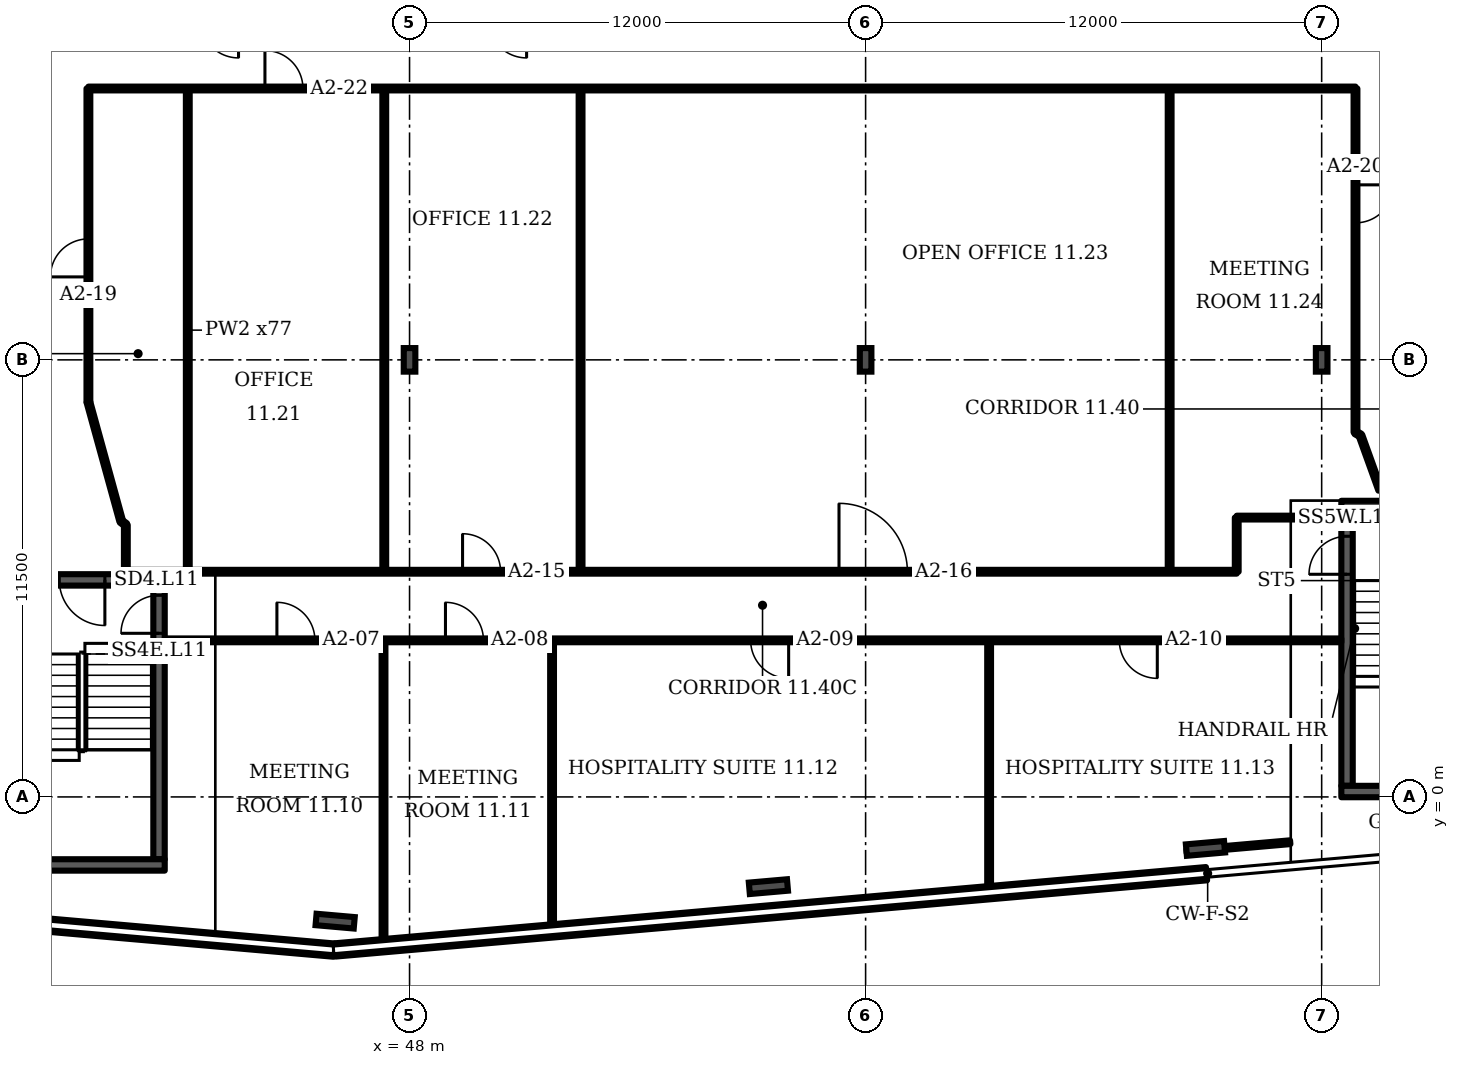
"""IFC4 building model, lengths in metres.
Left out: names, types, materials, properties, quantities, classifications, styles, units other than length and angle.
Written with IfcOpenShell. Run it as: python <this file> out.ifc"""

import sys

from ifc_helpers import new_model, si_unit, direction, frame, frame_2d, origin, origin_2d, place, context, subcontext, project, spatial, rectangle, i_section, extrude, element, fill, save


model = new_model("IFC4")
c1 = context("Model", 3, precision=1e-05, world=origin(), true_north=direction((0.0, 1.0)))
c2 = subcontext(c1, "Body", "Model", "MODEL_VIEW")
j1 = project(units=[si_unit("LENGTHUNIT", "METRE"), si_unit("PLANEANGLEUNIT", "RADIAN")], contexts=[c1])
p1 = place(None, origin())
s1 = spatial("IfcSite", under=j1, at=p1, CompositionType="ELEMENT")
p2 = place(p1, origin())
s2 = spatial("IfcBuilding", under=s1, at=p2, CompositionType="ELEMENT")
p3 = place(p2, frame((0.0, 0.0, 59.5)))
s3 = spatial("IfcBuildingStorey", under=s2, at=p3, CompositionType="ELEMENT", Elevation=59.5)
for number, where, z_axis, x_axis in (
    (1, (46.042, -3.268, 0.0), (0.0, 0.0, 1.0), (-0.087, -0.996, 0.0)),
    (2, (57.442, -2.361, 0.0), (0.0, 0.0, 1.0), (0.087, -0.996, 0.0)),
    (3, (68.942, -1.355, 0.0), (0.0, 0.0, 1.0), (0.087, -0.996, 0.0)),
):
    element("IfcColumn", number, at=place(p3, frame(where, z_axis=z_axis, x_axis=x_axis)), inside=s3, PredefinedType="COLUMN", context=c2, shape_type="SweptSolid", body=[
        extrude(i_section(OverallWidth=0.302, OverallDepth=1.008, WebThickness=0.021, FlangeThickness=0.04, FilletRadius=0.03, at=origin_2d()), origin(), (0.0, 0.0, 1.0), 3.6),
    ])
for number, where, z_axis, x_axis in (
    (4, (48.0, 11.5, 0.0), (0.0, 0.0, 1.0), (1.0, 0.0, 0.0)),
    (5, (60.0, 11.5, 0.0), (0.0, 0.0, 1.0), (1.0, 0.0, 0.0)),
    (6, (72.0, 11.5, 0.0), (0.0, 0.0, 1.0), (1.0, 0.0, 0.0)),
):
    element("IfcColumn", number, at=place(p3, frame(where, z_axis=z_axis, x_axis=x_axis)), inside=s3, PredefinedType="COLUMN", context=c2, shape_type="SweptSolid", body=[
        extrude(i_section(OverallWidth=0.305, OverallDepth=0.62, WebThickness=0.021, FlangeThickness=0.04, FilletRadius=0.027, at=origin_2d()), origin(), (0.0, 0.0, 1.0), 3.6),
    ])
p4 = place(p3, frame((34.601, -3.032, 0.0), z_axis=(0.0, 0.0, 1.0), x_axis=(0.996193, -0.087148, 0.0)))
e7 = element("IfcWall", 7, at=p4, inside=s3, PredefinedType="SOLIDWALL", context=c2, shape_type="SweptSolid", body=[
    extrude(rectangle(XDim=11.458, YDim=0.35, at=frame_2d((5.729, 0.0))), origin(), (0.0, 0.0, 1.0), 1.0),
])
p5 = place(p3, frame((46.045, -4.026, 0.0), z_axis=(0.0, 0.0, 1.0), x_axis=(0.99619, 0.087163, 0.0)))
e8 = element("IfcWall", 8, at=p5, inside=s3, PredefinedType="SOLIDWALL", context=c2, shape_type="SweptSolid", body=[
    extrude(rectangle(XDim=23.013, YDim=0.35, at=frame_2d((11.506, 0.0))), origin(), (0.0, 0.0, 1.0), 1.0),
])
p6 = place(p3, frame((37.208, 5.711, 0.0), z_axis=(0.0, 0.0, 1.0), x_axis=(1.0, 0.0, 0.0)))
e9 = element("IfcWall", 9, at=p6, inside=s3, PredefinedType="SHEAR", context=c2, shape_type="SweptSolid", body=[
    extrude(rectangle(XDim=4.35, YDim=0.3, at=frame_2d((2.175, 0.0))), origin(), (0.0, 0.0, 1.0), 3.2),
])
p7 = place(p6, frame((1.575, 0.0, 0.0)))
e10 = element("IfcOpeningElement", 10, at=p7, cuts=e9, PredefinedType="OPENING", context=c2, shape_type="SweptSolid", body=[
    extrude(rectangle(XDim=1.2, YDim=2.1, at=frame_2d((0.6, 1.05))), frame((0.0, 0.16, 0.0), z_axis=(0.0, -1.0, 0.0), x_axis=(1.0, 0.0, 0.0)), (0.0, 0.0, 1.0), 0.32),
])
p8 = place(p3, frame((41.408, -1.639, 0.0), z_axis=(0.0, 0.0, 1.0), x_axis=(0.0, 1.0, 0.0)))
e11 = element("IfcWall", 11, at=p8, inside=s3, PredefinedType="SHEAR", context=c2, shape_type="SweptSolid", body=[
    extrude(rectangle(XDim=7.2, YDim=0.3, at=frame_2d((3.6, 0.0))), origin(), (0.0, 0.0, 1.0), 3.2),
])
p9 = place(p8, frame((5.945, 0.0, 0.0)))
e12 = element("IfcOpeningElement", 12, at=p9, cuts=e11, PredefinedType="OPENING", context=c2, shape_type="SweptSolid", body=[
    extrude(rectangle(XDim=1.0, YDim=2.1, at=frame_2d((0.5, 1.05))), frame((0.0, 0.16, 0.0), z_axis=(0.0, -1.0, 0.0), x_axis=(1.0, 0.0, 0.0)), (0.0, 0.0, 1.0), 0.32),
])
p10 = place(p3, frame((72.518, 7.642, 0.0), z_axis=(0.0, 0.0, 1.0), x_axis=(1.0, 0.0, 0.0)))
e13 = element("IfcWall", 13, at=p10, inside=s3, PredefinedType="SHEAR", context=c2, shape_type="SweptSolid", body=[
    extrude(rectangle(XDim=4.35, YDim=0.3, at=frame_2d((2.175, 0.0))), origin(), (0.0, 0.0, 1.0), 3.2),
])
p11 = place(p10, frame((1.575, 0.0, 0.0)))
e14 = element("IfcOpeningElement", 14, at=p11, cuts=e13, PredefinedType="OPENING", context=c2, shape_type="SweptSolid", body=[
    extrude(rectangle(XDim=1.2, YDim=2.1, at=frame_2d((0.6, 1.05))), frame((0.0, 0.16, 0.0), z_axis=(0.0, -1.0, 0.0), x_axis=(1.0, 0.0, 0.0)), (0.0, 0.0, 1.0), 0.32),
])
p12 = place(p3, frame((72.667, 0.292, 0.0), z_axis=(0.0, 0.0, 1.0), x_axis=(0.0, 1.0, 0.0)))
e15 = element("IfcWall", 15, at=p12, inside=s3, PredefinedType="SHEAR", context=c2, shape_type="SweptSolid", body=[
    extrude(rectangle(XDim=7.2, YDim=0.3, at=frame_2d((3.6, 0.0))), origin(), (0.0, 0.0, 1.0), 3.2),
])
p13 = place(p12, frame((5.566, 0.0, 0.0)))
e16 = element("IfcOpeningElement", 16, at=p13, cuts=e15, PredefinedType="OPENING", context=c2, shape_type="SweptSolid", body=[
    extrude(rectangle(XDim=1.0, YDim=2.1, at=frame_2d((0.5, 1.05))), frame((0.0, 0.16, 0.0), z_axis=(0.0, -1.0, 0.0), x_axis=(1.0, 0.0, 0.0)), (0.0, 0.0, 1.0), 0.32),
])
p14 = place(p3, frame((39.55, 10.39, 0.0), z_axis=(0.0, 0.0, 1.0), x_axis=(0.0, 1.0, 0.0)))
e17 = element("IfcWall", 17, at=p14, inside=s3, PredefinedType="PARTITIONING", context=c2, shape_type="SweptSolid", body=[
    extrude(rectangle(XDim=8.25, YDim=0.1, at=frame_2d((4.125, 0.0))), origin(), (0.0, 0.0, 1.0), 3.2),
])
p15 = place(p14, frame((3.293, 0.0, 0.0)))
e18 = element("IfcOpeningElement", 18, at=p15, cuts=e17, PredefinedType="OPENING", context=c2, shape_type="SweptSolid", body=[
    extrude(rectangle(XDim=1.0, YDim=2.1, at=frame_2d((0.5, 1.05))), frame((0.0, 0.06, 0.0), z_axis=(0.0, -1.0, 0.0), x_axis=(1.0, 0.0, 0.0)), (0.0, 0.0, 1.0), 0.12),
])
p16 = place(p3, frame((39.55, 18.64, 0.0), z_axis=(0.0, 0.0, 1.0), x_axis=(1.0, 0.0, 0.0)))
e19 = element("IfcWall", 19, at=p16, inside=s3, PredefinedType="PARTITIONING", context=c2, shape_type="SweptSolid", body=[
    extrude(rectangle(XDim=33.34, YDim=0.1, at=frame_2d((16.67, 0.0))), origin(), (0.0, 0.0, 1.0), 3.2),
])
p17 = place(p16, frame((4.645, 0.0, 0.0)))
e20 = element("IfcOpeningElement", 20, at=p17, cuts=e19, PredefinedType="OPENING", context=c2, shape_type="SweptSolid", body=[
    extrude(rectangle(XDim=1.0, YDim=2.1, at=frame_2d((0.5, 1.05))), frame((0.0, 0.06, 0.0), z_axis=(0.0, -1.0, 0.0), x_axis=(1.0, 0.0, 0.0)), (0.0, 0.0, 1.0), 0.12),
])
p18 = place(p3, frame((40.415, 7.25, 0.0), z_axis=(0.0, 0.0, 1.0), x_axis=(-0.26559, 0.964085, 0.0)))
e21 = element("IfcWall", 21, at=p18, inside=s3, PredefinedType="PARTITIONING", context=c2, shape_type="SweptSolid", body=[
    extrude(rectangle(XDim=3.257, YDim=0.1, at=frame_2d((1.628, 0.0))), origin(), (0.0, 0.0, 1.0), 3.2),
])
p19 = place(p3, frame((40.535, 5.925, 0.0), z_axis=(0.0, 0.0, 1.0), x_axis=(0.0, 1.0, 0.0)))
e22 = element("IfcWall", 22, at=p19, inside=s3, PredefinedType="PARTITIONING", context=c2, shape_type="SweptSolid", body=[
    extrude(rectangle(XDim=1.235, YDim=0.1, at=frame_2d((0.617, 0.0))), origin(), (0.0, 0.0, 1.0), 3.2),
])
p20 = place(p3, frame((40.535, 5.925, 0.0), z_axis=(0.0, 0.0, 1.0), x_axis=(1.0, 0.0, 0.0)))
e23 = element("IfcWall", 23, at=p20, inside=s3, PredefinedType="PARTITIONING", context=c2, shape_type="SweptSolid", body=[
    extrude(rectangle(XDim=29.23, YDim=0.1, at=frame_2d((14.615, 0.0))), origin(), (0.0, 0.0, 1.0), 3.2),
])
p21 = place(p20, frame((8.86, 0.0, 0.0)))
e24 = element("IfcOpeningElement", 24, at=p21, cuts=e23, PredefinedType="OPENING", context=c2, shape_type="SweptSolid", body=[
    extrude(rectangle(XDim=1.0, YDim=2.1, at=frame_2d((0.5, 1.05))), frame((0.0, 0.06, 0.0), z_axis=(0.0, -1.0, 0.0), x_axis=(1.0, 0.0, 0.0)), (0.0, 0.0, 1.0), 0.12),
])
p22 = place(p20, frame((18.765, 0.0, 0.0)))
e25 = element("IfcOpeningElement", 25, at=p22, cuts=e23, PredefinedType="OPENING", context=c2, shape_type="SweptSolid", body=[
    extrude(rectangle(XDim=1.8, YDim=2.1, at=frame_2d((0.9, 1.05))), frame((0.0, 0.06, 0.0), z_axis=(0.0, -1.0, 0.0), x_axis=(1.0, 0.0, 0.0)), (0.0, 0.0, 1.0), 0.12),
])
p23 = place(p3, frame((40.535, 7.16, 0.0), z_axis=(0.0, 0.0, 1.0), x_axis=(-0.799412, 0.60078, 0.0)))
e26 = element("IfcWall", 26, at=p23, inside=s3, PredefinedType="PARTITIONING", context=c2, shape_type="SweptSolid", body=[
    extrude(rectangle(XDim=0.15, YDim=0.1, at=frame_2d((0.075, 0.0))), origin(), (0.0, 0.0, 1.0), 3.2),
])
p24 = place(p3, frame((41.558, 4.12, 0.0), z_axis=(0.0, 0.0, 1.0), x_axis=(1.0, 0.0, 0.0)))
e27 = element("IfcWall", 27, at=p24, inside=s3, PredefinedType="PARTITIONING", context=c2, shape_type="SweptSolid", body=[
    extrude(rectangle(XDim=30.959, YDim=0.1, at=frame_2d((15.479, 0.0))), origin(), (0.0, 0.0, 1.0), 3.2),
])
p25 = place(p24, frame((2.952, 0.0, 0.0)))
e28 = element("IfcOpeningElement", 28, at=p25, cuts=e27, PredefinedType="OPENING", context=c2, shape_type="SweptSolid", body=[
    extrude(rectangle(XDim=1.0, YDim=2.1, at=frame_2d((0.5, 1.05))), frame((0.0, 0.06, 0.0), z_axis=(0.0, -1.0, 0.0), x_axis=(1.0, 0.0, 0.0)), (0.0, 0.0, 1.0), 0.12),
])
p26 = place(p24, frame((7.387, 0.0, 0.0)))
e29 = element("IfcOpeningElement", 29, at=p26, cuts=e27, PredefinedType="OPENING", context=c2, shape_type="SweptSolid", body=[
    extrude(rectangle(XDim=1.0, YDim=2.1, at=frame_2d((0.5, 1.05))), frame((0.0, 0.06, 0.0), z_axis=(0.0, -1.0, 0.0), x_axis=(1.0, 0.0, 0.0)), (0.0, 0.0, 1.0), 0.12),
])
p27 = place(p24, frame((15.417, 0.0, 0.0)))
e30 = element("IfcOpeningElement", 30, at=p27, cuts=e27, PredefinedType="OPENING", context=c2, shape_type="SweptSolid", body=[
    extrude(rectangle(XDim=1.0, YDim=2.1, at=frame_2d((0.5, 1.05))), frame((0.0, 0.06, 0.0), z_axis=(0.0, -1.0, 0.0), x_axis=(1.0, 0.0, 0.0)), (0.0, 0.0, 1.0), 0.12),
])
p28 = place(p24, frame((25.117, 0.0, 0.0)))
e31 = element("IfcOpeningElement", 31, at=p28, cuts=e27, PredefinedType="OPENING", context=c2, shape_type="SweptSolid", body=[
    extrude(rectangle(XDim=1.0, YDim=2.1, at=frame_2d((0.5, 1.05))), frame((0.0, 0.06, 0.0), z_axis=(0.0, -1.0, 0.0), x_axis=(1.0, 0.0, 0.0)), (0.0, 0.0, 1.0), 0.12),
])
p29 = place(p3, frame((42.165, 5.925, 0.0), z_axis=(0.0, 0.0, 1.0), x_axis=(0.0, 1.0, 0.0)))
e32 = element("IfcWall", 32, at=p29, inside=s3, PredefinedType="PARTITIONING", context=c2, shape_type="SweptSolid", body=[
    extrude(rectangle(XDim=12.715, YDim=0.1, at=frame_2d((6.357, 0.0))), origin(), (0.0, 0.0, 1.0), 3.2),
])
p30 = place(p3, frame((47.315, -3.889, 0.0), z_axis=(0.0, 0.0, 1.0), x_axis=(0.0, 1.0, 0.0)))
e33 = element("IfcWall", 33, at=p30, inside=s3, PredefinedType="PARTITIONING", context=c2, shape_type="SweptSolid", body=[
    extrude(rectangle(XDim=8.01, YDim=0.1, at=frame_2d((4.005, 0.0))), origin(), (0.0, 0.0, 1.0), 2.58),
])
p31 = place(p3, frame((47.335, 5.925, 0.0), z_axis=(0.0, 0.0, 1.0), x_axis=(0.0, 1.0, 0.0)))
e34 = element("IfcWall", 34, at=p31, inside=s3, PredefinedType="PARTITIONING", context=c2, shape_type="SweptSolid", body=[
    extrude(rectangle(XDim=12.715, YDim=0.1, at=frame_2d((6.357, 0.0))), origin(), (0.0, 0.0, 1.0), 3.2),
])
p32 = place(p3, frame((51.75, -3.501, 0.0), z_axis=(0.0, 0.0, 1.0), x_axis=(0.0, 1.0, 0.0)))
e35 = element("IfcWall", 35, at=p32, inside=s3, PredefinedType="PARTITIONING", context=c2, shape_type="SweptSolid", body=[
    extrude(rectangle(XDim=7.621, YDim=0.1, at=frame_2d((3.811, 0.0))), origin(), (0.0, 0.0, 1.0), 2.58),
])
p33 = place(p3, frame((52.5, 5.93, 0.0), z_axis=(0.0, 0.0, 1.0), x_axis=(0.0, 1.0, 0.0)))
e36 = element("IfcWall", 36, at=p33, inside=s3, PredefinedType="PARTITIONING", context=c2, shape_type="SweptSolid", body=[
    extrude(rectangle(XDim=12.71, YDim=0.1, at=frame_2d((6.355, 0.0))), origin(), (0.0, 0.0, 1.0), 3.2),
])
p34 = place(p3, frame((63.25, -2.495, 0.0), z_axis=(0.0, 0.0, 1.0), x_axis=(0.0, 1.0, 0.0)))
e37 = element("IfcWall", 37, at=p34, inside=s3, PredefinedType="PARTITIONING", context=c2, shape_type="SweptSolid", body=[
    extrude(rectangle(XDim=6.615, YDim=0.1, at=frame_2d((3.308, 0.0))), origin(), (0.0, 0.0, 1.0), 2.58),
])
p35 = place(p3, frame((68.0, 5.925, 0.0), z_axis=(0.0, 0.0, 1.0), x_axis=(0.0, 1.0, 0.0)))
e38 = element("IfcWall", 38, at=p35, inside=s3, PredefinedType="PARTITIONING", context=c2, shape_type="SweptSolid", body=[
    extrude(rectangle(XDim=12.715, YDim=0.1, at=frame_2d((6.357, 0.0))), origin(), (0.0, 0.0, 1.0), 3.2),
])
p36 = place(p3, frame((68.445, -1.43, 0.0), z_axis=(0.0, 0.0, 1.0), x_axis=(0.996195, 0.087118, 0.0)))
e39 = element("IfcWall", 39, at=p36, inside=s3, PredefinedType="PARTITIONING", context=c2, shape_type="SweptSolid", body=[
    extrude(rectangle(XDim=2.738, YDim=0.1, at=frame_2d((1.369, 0.0))), origin(), (0.0, 0.0, 1.0), 2.58),
])
p37 = place(p3, frame((69.765, 5.925, 0.0), z_axis=(0.0, 0.0, 1.0), x_axis=(0.0, 1.0, 0.0)))
e40 = element("IfcWall", 40, at=p37, inside=s3, PredefinedType="PARTITIONING", context=c2, shape_type="SweptSolid", body=[
    extrude(rectangle(XDim=1.425, YDim=0.1, at=frame_2d((0.712, 0.0))), origin(), (0.0, 0.0, 1.0), 3.2),
])
p38 = place(p3, frame((69.765, 7.35, 0.0), z_axis=(0.0, 0.0, 1.0), x_axis=(1.0, 0.0, 0.0)))
e41 = element("IfcWall", 41, at=p38, inside=s3, PredefinedType="PARTITIONING", context=c2, shape_type="SweptSolid", body=[
    extrude(rectangle(XDim=2.753, YDim=0.1, at=frame_2d((1.376, 0.0))), origin(), (0.0, 0.0, 1.0), 3.2),
])
p39 = place(p3, frame((72.89, 9.59, 0.0), z_axis=(0.0, 0.0, 1.0), x_axis=(0.0, 1.0, 0.0)))
e42 = element("IfcWall", 42, at=p39, inside=s3, PredefinedType="PARTITIONING", context=c2, shape_type="SweptSolid", body=[
    extrude(rectangle(XDim=9.05, YDim=0.1, at=frame_2d((4.525, 0.0))), origin(), (0.0, 0.0, 1.0), 3.2),
])
p40 = place(p39, frame((5.515, 0.0, 0.0)))
e43 = element("IfcOpeningElement", 43, at=p40, cuts=e42, PredefinedType="OPENING", context=c2, shape_type="SweptSolid", body=[
    extrude(rectangle(XDim=1.0, YDim=2.1, at=frame_2d((0.5, 1.05))), frame((0.0, 0.06, 0.0), z_axis=(0.0, -1.0, 0.0), x_axis=(1.0, 0.0, 0.0)), (0.0, 0.0, 1.0), 0.12),
])
p41 = place(p3, frame((73.02, 9.515, 0.0), z_axis=(0.0, 0.0, 1.0), x_axis=(-0.865836, 0.500333, 0.0)))
e44 = element("IfcWall", 44, at=p41, inside=s3, PredefinedType="PARTITIONING", context=c2, shape_type="SweptSolid", body=[
    extrude(rectangle(XDim=0.15, YDim=0.1, at=frame_2d((0.075, 0.0))), origin(), (0.0, 0.0, 1.0), 3.2),
])
p42 = place(p3, frame((73.54, 8.075, 0.0), z_axis=(0.0, 0.0, 1.0), x_axis=(-0.339669, 0.940548, 0.0)))
e45 = element("IfcWall", 45, at=p42, inside=s3, PredefinedType="PARTITIONING", context=c2, shape_type="SweptSolid", body=[
    extrude(rectangle(XDim=1.531, YDim=0.1, at=frame_2d((0.766, 0.0))), origin(), (0.0, 0.0, 1.0), 3.2),
])
p43 = place(p3, frame((72.817, 7.354, 0.0), z_axis=(0.0, 0.0, 1.0), x_axis=(0.999994, 0.002027, 0.0)))
e46 = element("IfcWall", 46, at=p43, inside=s3, PredefinedType="PARTITIONING", context=c2, shape_type="SweptSolid", body=[
    extrude(rectangle(XDim=0.723, YDim=0.1, at=frame_2d((0.361, 0.0))), origin(), (0.0, 0.0, 1.0), 3.2),
])
p44 = place(p3, frame((37.208, -1.789, 0.0), z_axis=(0.0, 0.0, 1.0), x_axis=(1.0, 0.0, 0.0)))
e47 = element("IfcWall", 47, at=p44, inside=s3, PredefinedType="SHEAR", context=c2, shape_type="SweptSolid", body=[
    extrude(rectangle(XDim=4.35, YDim=0.3, at=frame_2d((2.175, 0.0))), origin(), (0.0, 0.0, 1.0), 3.2),
])
p45 = place(p3, frame((72.518, 0.142, 0.0), z_axis=(0.0, 0.0, 1.0), x_axis=(1.0, 0.0, 0.0)))
e48 = element("IfcWall", 48, at=p45, inside=s3, PredefinedType="SHEAR", context=c2, shape_type="SweptSolid", body=[
    extrude(rectangle(XDim=4.05, YDim=0.3, at=frame_2d((2.025, 0.0))), origin(), (0.0, 0.0, 1.0), 3.2),
])
p46 = place(p9, origin())
e49 = element("IfcDoor", 49, at=p46, inside=s3, OperationType="SINGLE_SWING_LEFT", PredefinedType="DOOR", context=c2, shape_type="SweptSolid", body=[
    extrude(rectangle(XDim=1.0, YDim=2.1, at=frame_2d((0.5, 1.05))), frame((0.0, 0.025, 0.0), z_axis=(0.0, -1.0, 0.0), x_axis=(1.0, 0.0, 0.0)), (0.0, 0.0, 1.0), 0.05),
])
fill(e12, e49)
p47 = place(p7, origin())
e50 = element("IfcDoor", 50, at=p47, inside=s3, OperationType="SINGLE_SWING_RIGHT", PredefinedType="DOOR", context=c2, shape_type="SweptSolid", body=[
    extrude(rectangle(XDim=1.2, YDim=2.1, at=frame_2d((0.6, 1.05))), frame((0.0, 0.025, 0.0), z_axis=(0.0, -1.0, 0.0), x_axis=(1.0, 0.0, 0.0)), (0.0, 0.0, 1.0), 0.05),
])
fill(e10, e50)
p48 = place(p13, origin())
e51 = element("IfcDoor", 51, at=p48, inside=s3, OperationType="SINGLE_SWING_LEFT", PredefinedType="DOOR", context=c2, shape_type="SweptSolid", body=[
    extrude(rectangle(XDim=1.0, YDim=2.1, at=frame_2d((0.5, 1.05))), frame((0.0, 0.025, 0.0), z_axis=(0.0, -1.0, 0.0), x_axis=(1.0, 0.0, 0.0)), (0.0, 0.0, 1.0), 0.05),
])
fill(e16, e51)
p49 = place(p25, origin())
e52 = element("IfcDoor", 52, at=p49, inside=s3, OperationType="SINGLE_SWING_LEFT", PredefinedType="DOOR", context=c2, shape_type="SweptSolid", body=[
    extrude(rectangle(XDim=1.0, YDim=2.1, at=frame_2d((0.5, 1.05))), frame((0.0, 0.025, 0.0), z_axis=(0.0, -1.0, 0.0), x_axis=(1.0, 0.0, 0.0)), (0.0, 0.0, 1.0), 0.05),
])
fill(e28, e52)
p50 = place(p26, origin())
e53 = element("IfcDoor", 53, at=p50, inside=s3, OperationType="SINGLE_SWING_LEFT", PredefinedType="DOOR", context=c2, shape_type="SweptSolid", body=[
    extrude(rectangle(XDim=1.0, YDim=2.1, at=frame_2d((0.5, 1.05))), frame((0.0, 0.025, 0.0), z_axis=(0.0, -1.0, 0.0), x_axis=(1.0, 0.0, 0.0)), (0.0, 0.0, 1.0), 0.05),
])
fill(e29, e53)
p51 = place(p27, origin())
e54 = element("IfcDoor", 54, at=p51, inside=s3, OperationType="SINGLE_SWING_RIGHT", PredefinedType="DOOR", context=c2, shape_type="SweptSolid", body=[
    extrude(rectangle(XDim=1.0, YDim=2.1, at=frame_2d((0.5, 1.05))), frame((0.0, 0.025, 0.0), z_axis=(0.0, -1.0, 0.0), x_axis=(1.0, 0.0, 0.0)), (0.0, 0.0, 1.0), 0.05),
])
fill(e30, e54)
p52 = place(p28, origin())
e55 = element("IfcDoor", 55, at=p52, inside=s3, OperationType="SINGLE_SWING_RIGHT", PredefinedType="DOOR", context=c2, shape_type="SweptSolid", body=[
    extrude(rectangle(XDim=1.0, YDim=2.1, at=frame_2d((0.5, 1.05))), frame((0.0, 0.025, 0.0), z_axis=(0.0, -1.0, 0.0), x_axis=(1.0, 0.0, 0.0)), (0.0, 0.0, 1.0), 0.05),
])
fill(e31, e55)
p53 = place(p21, origin())
e56 = element("IfcDoor", 56, at=p53, inside=s3, OperationType="SINGLE_SWING_LEFT", PredefinedType="DOOR", context=c2, shape_type="SweptSolid", body=[
    extrude(rectangle(XDim=1.0, YDim=2.1, at=frame_2d((0.5, 1.05))), frame((0.0, 0.025, 0.0), z_axis=(0.0, -1.0, 0.0), x_axis=(1.0, 0.0, 0.0)), (0.0, 0.0, 1.0), 0.05),
])
fill(e24, e56)
p54 = place(p22, origin())
e57 = element("IfcDoor", 57, at=p54, inside=s3, OperationType="DOUBLE_DOOR_SINGLE_SWING", PredefinedType="DOOR", context=c2, shape_type="SweptSolid", body=[
    extrude(rectangle(XDim=1.8, YDim=2.1, at=frame_2d((0.9, 1.05))), frame((0.0, 0.025, 0.0), z_axis=(0.0, -1.0, 0.0), x_axis=(1.0, 0.0, 0.0)), (0.0, 0.0, 1.0), 0.05),
])
fill(e25, e57)
p55 = place(p15, origin())
e58 = element("IfcDoor", 58, at=p55, inside=s3, OperationType="SINGLE_SWING_LEFT", PredefinedType="DOOR", context=c2, shape_type="SweptSolid", body=[
    extrude(rectangle(XDim=1.0, YDim=2.1, at=frame_2d((0.5, 1.05))), frame((0.0, 0.025, 0.0), z_axis=(0.0, -1.0, 0.0), x_axis=(1.0, 0.0, 0.0)), (0.0, 0.0, 1.0), 0.05),
])
fill(e18, e58)
p56 = place(p40, origin())
e59 = element("IfcDoor", 59, at=p56, inside=s3, OperationType="SINGLE_SWING_RIGHT", PredefinedType="DOOR", context=c2, shape_type="SweptSolid", body=[
    extrude(rectangle(XDim=1.0, YDim=2.1, at=frame_2d((0.5, 1.05))), frame((0.0, 0.025, 0.0), z_axis=(0.0, -1.0, 0.0), x_axis=(1.0, 0.0, 0.0)), (0.0, 0.0, 1.0), 0.05),
])
fill(e43, e59)
p57 = place(p17, origin())
e60 = element("IfcDoor", 60, at=p57, inside=s3, OperationType="SINGLE_SWING_LEFT", PredefinedType="DOOR", context=c2, shape_type="SweptSolid", body=[
    extrude(rectangle(XDim=1.0, YDim=2.1, at=frame_2d((0.5, 1.05))), frame((0.0, 0.025, 0.0), z_axis=(0.0, -1.0, 0.0), x_axis=(1.0, 0.0, 0.0)), (0.0, 0.0, 1.0), 0.05),
])
fill(e20, e60)
save(model, sys.argv[1])
